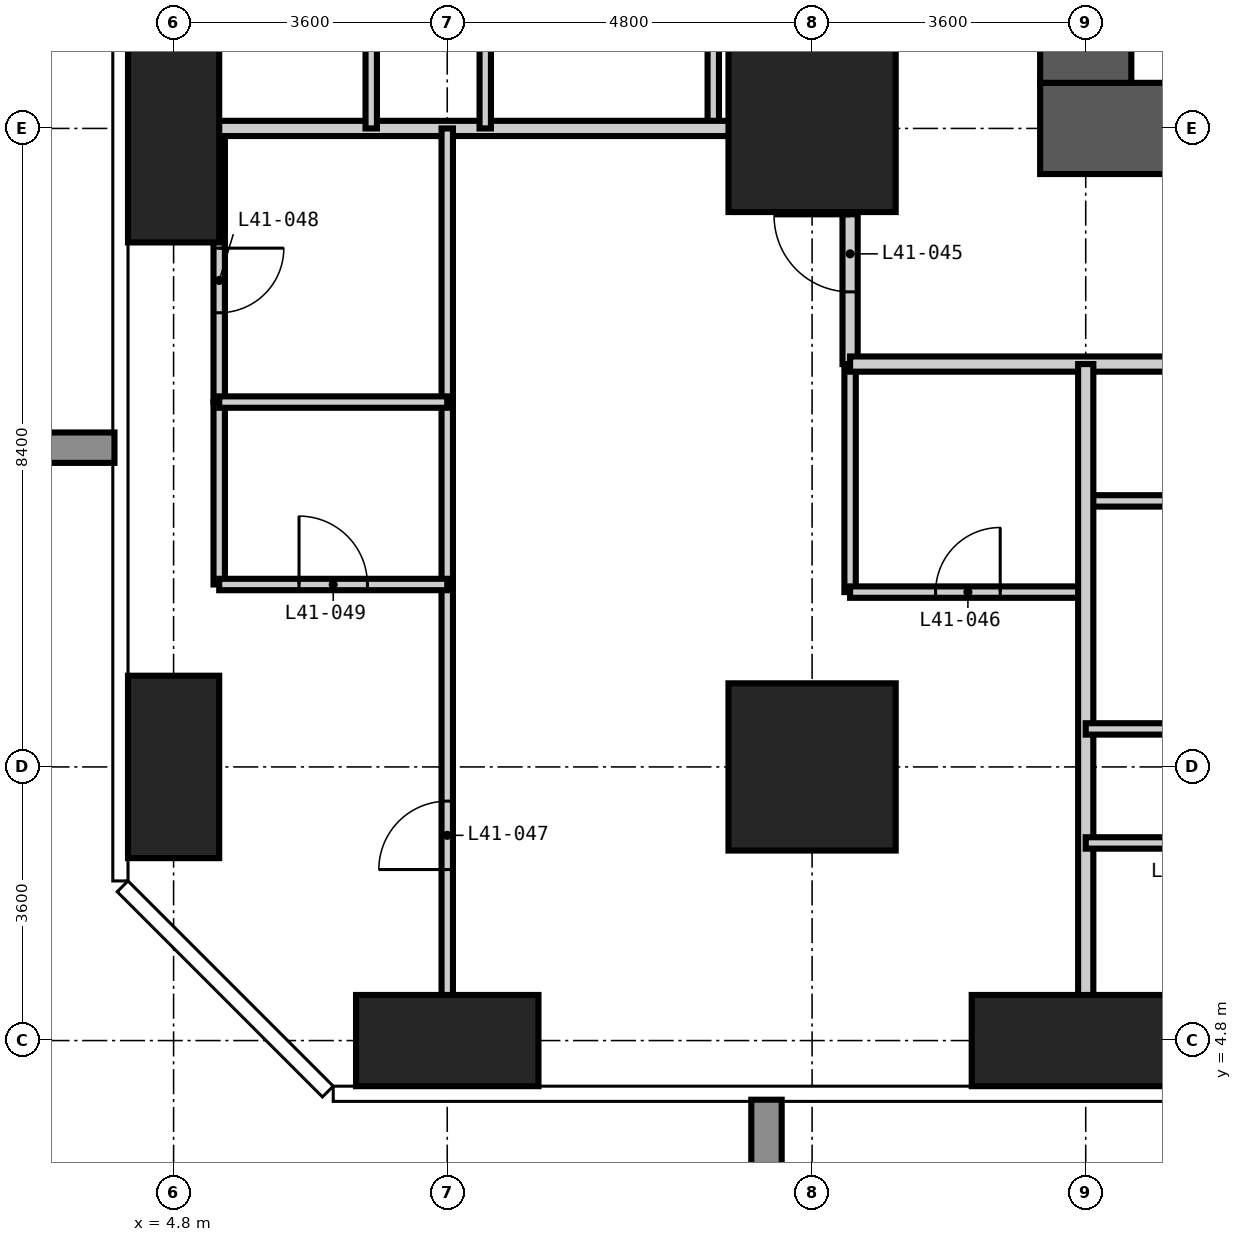
"""IFC4 building model, lengths in metres.
Left out: names, types, materials, properties, quantities, classifications, styles, units other than length and angle.
Written with IfcOpenShell. Run it as: python <this file> out.ifc"""

import sys

from ifc_helpers import new_model, si_unit, direction, frame, frame_2d, origin, origin_2d, place, context, subcontext, project, spatial, rectangle, extrude, element, fill, save


model = new_model("IFC4")
c1 = context("Model", 3, precision=1e-05, world=origin(), true_north=direction((0.0, 1.0)))
c2 = subcontext(c1, "Body", "Model", "MODEL_VIEW")
j1 = project(units=[si_unit("LENGTHUNIT", "METRE"), si_unit("PLANEANGLEUNIT", "RADIAN")], contexts=[c1])
p1 = place(None, origin())
s1 = spatial("IfcSite", under=j1, at=p1, CompositionType="ELEMENT")
p2 = place(p1, origin())
s2 = spatial("IfcBuilding", under=s1, at=p2, CompositionType="ELEMENT")
p3 = place(p2, frame((0.0, 0.0, 162.6)))
s3 = spatial("IfcBuildingStorey", under=s2, at=p3, CompositionType="ELEMENT", Elevation=162.6)
p4 = place(p3, frame((4.8, 8.4, -0.35), z_axis=(0.0, 0.0, 1.0), x_axis=(1.0, 0.0, 0.0)))
e1 = element("IfcColumn", 1, at=p4, inside=s3, PredefinedType="COLUMN", context=c2, shape_type="SweptSolid", body=[
    extrude(rectangle(XDim=1.2, YDim=2.4, at=origin_2d()), origin(), (0.0, 0.0, 1.0), 3.6),
])
p5 = place(p3, frame((4.8, 16.8, -0.35), z_axis=(0.0, 0.0, 1.0), x_axis=(1.0, 0.0, 0.0)))
e2 = element("IfcColumn", 2, at=p5, inside=s3, PredefinedType="COLUMN", context=c2, shape_type="SweptSolid", body=[
    extrude(rectangle(XDim=1.2, YDim=3.0, at=origin_2d()), origin(), (0.0, 0.0, 1.0), 3.6),
])
p6 = place(p3, frame((8.4, 4.8, -0.35), z_axis=(0.0, 0.0, 1.0), x_axis=(1.0, 0.0, 0.0)))
e3 = element("IfcColumn", 3, at=p6, inside=s3, PredefinedType="COLUMN", context=c2, shape_type="SweptSolid", body=[
    extrude(rectangle(XDim=2.4, YDim=1.2, at=origin_2d()), origin(), (0.0, 0.0, 1.0), 3.6),
])
for number, where, z_axis, x_axis in (
    (4, (13.2, 8.4, -0.35), (0.0, 0.0, 1.0), (1.0, 0.0, 0.0)),
    (5, (13.2, 16.8, -0.35), (0.0, 0.0, 1.0), (1.0, 0.0, 0.0)),
):
    element("IfcColumn", number, at=place(p3, frame(where, z_axis=z_axis, x_axis=x_axis)), inside=s3, PredefinedType="COLUMN", context=c2, shape_type="SweptSolid", body=[
        extrude(rectangle(XDim=2.2, YDim=2.2, at=origin_2d()), origin(), (0.0, 0.0, 1.0), 3.6),
    ])
p7 = place(p3, frame((16.8, 4.8, -0.35), z_axis=(0.0, 0.0, 1.0), x_axis=(1.0, 0.0, 0.0)))
e6 = element("IfcColumn", 6, at=p7, inside=s3, PredefinedType="COLUMN", context=c2, shape_type="SweptSolid", body=[
    extrude(rectangle(XDim=3.0, YDim=1.2, at=origin_2d()), origin(), (0.0, 0.0, 1.0), 3.6),
])
p8 = place(p3, frame((16.2, 16.8, -0.35), z_axis=(0.0, 0.0, 1.0), x_axis=(1.0, 0.0, 0.0)))
e7 = element("IfcWall", 7, at=p8, inside=s3, PredefinedType="SHEAR", context=c2, shape_type="SweptSolid", body=[
    extrude(rectangle(XDim=26.4, YDim=1.2, at=frame_2d((13.2, 0.0))), origin(), (0.0, 0.0, 1.0), 3.6),
])
p9 = place(p8, frame((12.7, 0.0, 0.35)))
e8 = element("IfcOpeningElement", 8, at=p9, cuts=e7, PredefinedType="OPENING", context=c2, shape_type="SweptSolid", body=[
    extrude(rectangle(XDim=1.0, YDim=2.1, at=frame_2d((0.5, 1.05))), frame((0.0, 0.61, 0.0), z_axis=(0.0, -1.0, 0.0), x_axis=(1.0, 0.0, 0.0)), (0.0, 0.0, 1.0), 1.22),
])
p10 = place(p8, frame((19.0, 0.0, 0.35)))
e9 = element("IfcOpeningElement", 9, at=p10, cuts=e7, PredefinedType="OPENING", context=c2, shape_type="SweptSolid", body=[
    extrude(rectangle(XDim=1.0, YDim=2.1, at=frame_2d((0.5, 1.05))), frame((0.0, 0.61, 0.0), z_axis=(0.0, -1.0, 0.0), x_axis=(1.0, 0.0, 0.0)), (0.0, 0.0, 1.0), 1.22),
])
p11 = place(p3, frame((16.8, 41.4, -0.35), z_axis=(0.0, 0.0, 1.0), x_axis=(0.0, -1.0, 0.0)))
e10 = element("IfcWall", 10, at=p11, inside=s3, PredefinedType="SHEAR", context=c2, shape_type="SweptSolid", body=[
    extrude(rectangle(XDim=24.0, YDim=1.2, at=frame_2d((12.0, 0.0))), origin(), (0.0, 0.0, 1.0), 3.6),
])
p12 = place(p11, frame((11.1, 0.0, 0.35)))
e11 = element("IfcOpeningElement", 11, at=p12, cuts=e10, PredefinedType="OPENING", context=c2, shape_type="SweptSolid", body=[
    extrude(rectangle(XDim=1.8, YDim=2.2, at=frame_2d((0.9, 1.1))), frame((0.0, 0.61, 0.0), z_axis=(0.0, -1.0, 0.0), x_axis=(1.0, 0.0, 0.0)), (0.0, 0.0, 1.0), 1.22),
])
p13 = place(p11, frame((19.9, 0.0, 0.35)))
e12 = element("IfcOpeningElement", 12, at=p13, cuts=e10, PredefinedType="OPENING", context=c2, shape_type="SweptSolid", body=[
    extrude(rectangle(XDim=1.0, YDim=2.1, at=frame_2d((0.5, 1.05))), frame((0.0, 0.61, 0.0), z_axis=(0.0, -1.0, 0.0), x_axis=(1.0, 0.0, 0.0)), (0.0, 0.0, 1.0), 1.22),
])
p14 = place(p11, frame((5.2, 0.0, 0.35)))
e13 = element("IfcOpeningElement", 13, at=p14, cuts=e10, PredefinedType="OPENING", context=c2, shape_type="SweptSolid", body=[
    extrude(rectangle(XDim=1.0, YDim=2.1, at=frame_2d((0.5, 1.05))), frame((0.0, 0.61, 0.0), z_axis=(0.0, -1.0, 0.0), x_axis=(1.0, 0.0, 0.0)), (0.0, 0.0, 1.0), 1.22),
])
p15 = place(p3, frame((5.4, 13.2, 0.0), z_axis=(0.0, 0.0, 1.0), x_axis=(0.0, 1.0, 0.0)))
e14 = element("IfcWall", 14, at=p15, inside=s3, PredefinedType="PARTITIONING", context=c2, shape_type="SweptSolid", body=[
    extrude(rectangle(XDim=3.6, YDim=0.15, at=frame_2d((1.8, 0.0))), origin(), (0.0, 0.0, 1.0), 3.25),
])
p16 = place(p15, frame((1.175, 0.0, 0.0)))
e15 = element("IfcOpeningElement", 15, at=p16, cuts=e14, PredefinedType="OPENING", context=c2, shape_type="SweptSolid", body=[
    extrude(rectangle(XDim=0.85, YDim=2.1, at=frame_2d((0.425, 1.05))), frame((0.0, 0.085, 0.0), z_axis=(0.0, -1.0, 0.0), x_axis=(1.0, 0.0, 0.0)), (0.0, 0.0, 1.0), 0.17),
])
p17 = place(p3, frame((11.9, 16.8, 0.0), z_axis=(0.0, 0.0, 1.0), x_axis=(0.0, 1.0, 0.0)))
e16 = element("IfcWall", 16, at=p17, inside=s3, PredefinedType="PARTITIONING", context=c2, shape_type="SweptSolid", body=[
    extrude(rectangle(XDim=3.0, YDim=0.15, at=frame_2d((1.5, 0.0))), origin(), (0.0, 0.0, 1.0), 3.25),
])
p18 = place(p17, frame((1.175, 0.0, 0.0)))
e17 = element("IfcOpeningElement", 17, at=p18, cuts=e16, PredefinedType="OPENING", context=c2, shape_type="SweptSolid", body=[
    extrude(rectangle(XDim=0.85, YDim=2.1, at=frame_2d((0.425, 1.05))), frame((0.0, 0.085, 0.0), z_axis=(0.0, -1.0, 0.0), x_axis=(1.0, 0.0, 0.0)), (0.0, 0.0, 1.0), 0.17),
])
p19 = place(p3, frame((13.7, 10.7, 0.0), z_axis=(0.0, 0.0, 1.0), x_axis=(0.0, 1.0, 0.0)))
e18 = element("IfcWall", 18, at=p19, inside=s3, PredefinedType="PARTITIONING", context=c2, shape_type="SweptSolid", body=[
    extrude(rectangle(XDim=3.0, YDim=0.15, at=frame_2d((1.5, 0.0))), origin(), (0.0, 0.0, 1.0), 3.25),
])
p20 = place(p3, frame((13.7, 10.7, 0.0), z_axis=(0.0, 0.0, 1.0), x_axis=(1.0, 0.0, 0.0)))
e19 = element("IfcWall", 19, at=p20, inside=s3, PredefinedType="PARTITIONING", context=c2, shape_type="SweptSolid", body=[
    extrude(rectangle(XDim=3.1, YDim=0.15, at=frame_2d((1.55, 0.0))), origin(), (0.0, 0.0, 1.0), 3.25),
])
p21 = place(p20, frame((1.125, 0.0, 0.0)))
e20 = element("IfcOpeningElement", 20, at=p21, cuts=e19, PredefinedType="OPENING", context=c2, shape_type="SweptSolid", body=[
    extrude(rectangle(XDim=0.85, YDim=2.1, at=frame_2d((0.425, 1.05))), frame((0.0, 0.085, 0.0), z_axis=(0.0, -1.0, 0.0), x_axis=(1.0, 0.0, 0.0)), (0.0, 0.0, 1.0), 0.17),
])
p22 = place(p3, frame((16.8, 11.9, 0.0), z_axis=(0.0, 0.0, 1.0), x_axis=(1.0, 0.0, 0.0)))
e21 = element("IfcWall", 21, at=p22, inside=s3, PredefinedType="PARTITIONING", context=c2, shape_type="SweptSolid", body=[
    extrude(rectangle(XDim=3.0, YDim=0.15, at=frame_2d((1.5, 0.0))), origin(), (0.0, 0.0, 1.0), 3.25),
])
p23 = place(p3, frame((13.7, 13.7, 0.0), z_axis=(0.0, 0.0, 1.0), x_axis=(0.0, 1.0, 0.0)))
e22 = element("IfcWall", 22, at=p23, inside=s3, PredefinedType="PARTITIONING", context=c2, shape_type="SweptSolid", body=[
    extrude(rectangle(XDim=30.8, YDim=0.2, at=frame_2d((15.4, 0.0))), origin(), (0.0, 0.0, 1.0), 3.25),
])
p24 = place(p23, frame((4.7, 0.0, 0.0)))
e23 = element("IfcOpeningElement", 23, at=p24, cuts=e22, PredefinedType="OPENING", context=c2, shape_type="SweptSolid", body=[
    extrude(rectangle(XDim=1.0, YDim=2.2, at=frame_2d((0.5, 1.1))), frame((0.0, 0.11, 0.0), z_axis=(0.0, -1.0, 0.0), x_axis=(1.0, 0.0, 0.0)), (0.0, 0.0, 1.0), 0.22),
])
p25 = place(p23, frame((8.9, 0.0, 0.0)))
e24 = element("IfcOpeningElement", 24, at=p25, cuts=e22, PredefinedType="OPENING", context=c2, shape_type="SweptSolid", body=[
    extrude(rectangle(XDim=1.0, YDim=2.2, at=frame_2d((0.5, 1.1))), frame((0.0, 0.11, 0.0), z_axis=(0.0, -1.0, 0.0), x_axis=(1.0, 0.0, 0.0)), (0.0, 0.0, 1.0), 0.22),
])
p26 = place(p23, frame((13.1, 0.0, 0.0)))
e25 = element("IfcOpeningElement", 25, at=p26, cuts=e22, PredefinedType="OPENING", context=c2, shape_type="SweptSolid", body=[
    extrude(rectangle(XDim=1.0, YDim=2.2, at=frame_2d((0.5, 1.1))), frame((0.0, 0.11, 0.0), z_axis=(0.0, -1.0, 0.0), x_axis=(1.0, 0.0, 0.0)), (0.0, 0.0, 1.0), 0.22),
])
p27 = place(p23, frame((17.3, 0.0, 0.0)))
e26 = element("IfcOpeningElement", 26, at=p27, cuts=e22, PredefinedType="OPENING", context=c2, shape_type="SweptSolid", body=[
    extrude(rectangle(XDim=1.0, YDim=2.2, at=frame_2d((0.5, 1.1))), frame((0.0, 0.11, 0.0), z_axis=(0.0, -1.0, 0.0), x_axis=(1.0, 0.0, 0.0)), (0.0, 0.0, 1.0), 0.22),
])
p28 = place(p23, frame((21.5, 0.0, 0.0)))
e27 = element("IfcOpeningElement", 27, at=p28, cuts=e22, PredefinedType="OPENING", context=c2, shape_type="SweptSolid", body=[
    extrude(rectangle(XDim=1.0, YDim=2.2, at=frame_2d((0.5, 1.1))), frame((0.0, 0.11, 0.0), z_axis=(0.0, -1.0, 0.0), x_axis=(1.0, 0.0, 0.0)), (0.0, 0.0, 1.0), 0.22),
])
p29 = place(p23, frame((25.7, 0.0, 0.0)))
e28 = element("IfcOpeningElement", 28, at=p29, cuts=e22, PredefinedType="OPENING", context=c2, shape_type="SweptSolid", body=[
    extrude(rectangle(XDim=1.0, YDim=2.2, at=frame_2d((0.5, 1.1))), frame((0.0, 0.11, 0.0), z_axis=(0.0, -1.0, 0.0), x_axis=(1.0, 0.0, 0.0)), (0.0, 0.0, 1.0), 0.22),
])
p30 = place(p23, frame((0.95, 0.0, 0.0)))
e29 = element("IfcOpeningElement", 29, at=p30, cuts=e22, PredefinedType="OPENING", context=c2, shape_type="SweptSolid", body=[
    extrude(rectangle(XDim=1.0, YDim=2.2, at=frame_2d((0.5, 1.1))), frame((0.0, 0.11, 0.0), z_axis=(0.0, -1.0, 0.0), x_axis=(1.0, 0.0, 0.0)), (0.0, 0.0, 1.0), 0.22),
])
p31 = place(p23, frame((29.45, 0.0, 0.0)))
e30 = element("IfcOpeningElement", 30, at=p31, cuts=e22, PredefinedType="OPENING", context=c2, shape_type="SweptSolid", body=[
    extrude(rectangle(XDim=1.0, YDim=2.2, at=frame_2d((0.5, 1.1))), frame((0.0, 0.11, 0.0), z_axis=(0.0, -1.0, 0.0), x_axis=(1.0, 0.0, 0.0)), (0.0, 0.0, 1.0), 0.22),
])
p32 = place(p3, frame((45.7, 13.7, 0.0), z_axis=(0.0, 0.0, 1.0), x_axis=(-1.0, 0.0, 0.0)))
e31 = element("IfcWall", 31, at=p32, inside=s3, PredefinedType="PARTITIONING", context=c2, shape_type="SweptSolid", body=[
    extrude(rectangle(XDim=32.0, YDim=0.2, at=frame_2d((16.0, 0.0))), origin(), (0.0, 0.0, 1.0), 3.25),
])
p33 = place(p32, frame((24.2, 0.0, 0.0)))
e32 = element("IfcOpeningElement", 32, at=p33, cuts=e31, PredefinedType="OPENING", context=c2, shape_type="SweptSolid", body=[
    extrude(rectangle(XDim=1.0, YDim=2.2, at=frame_2d((0.5, 1.1))), frame((0.0, 0.11, 0.0), z_axis=(0.0, -1.0, 0.0), x_axis=(1.0, 0.0, 0.0)), (0.0, 0.0, 1.0), 0.22),
])
p34 = place(p32, frame((15.8, 0.0, 0.0)))
e33 = element("IfcOpeningElement", 33, at=p34, cuts=e31, PredefinedType="OPENING", context=c2, shape_type="SweptSolid", body=[
    extrude(rectangle(XDim=1.0, YDim=2.2, at=frame_2d((0.5, 1.1))), frame((0.0, 0.11, 0.0), z_axis=(0.0, -1.0, 0.0), x_axis=(1.0, 0.0, 0.0)), (0.0, 0.0, 1.0), 0.22),
])
p35 = place(p32, frame((7.4, 0.0, 0.0)))
e34 = element("IfcOpeningElement", 34, at=p35, cuts=e31, PredefinedType="OPENING", context=c2, shape_type="SweptSolid", body=[
    extrude(rectangle(XDim=1.0, YDim=2.2, at=frame_2d((0.5, 1.1))), frame((0.0, 0.11, 0.0), z_axis=(0.0, -1.0, 0.0), x_axis=(1.0, 0.0, 0.0)), (0.0, 0.0, 1.0), 0.22),
])
for number, where, z_axis, x_axis in (
    (35, (16.8, 4.182, 0.0), (0.0, 0.0, 1.0), (0.0, 1.0, 0.0)),
    (36, (4.182, 16.8, 0.0), (0.0, 0.0, 1.0), (1.0, 0.0, 0.0)),
):
    element("IfcWall", number, at=place(p3, frame(where, z_axis=z_axis, x_axis=x_axis)), inside=s3, PredefinedType="PARTITIONING", context=c2, shape_type="SweptSolid", body=[
        extrude(rectangle(XDim=9.518, YDim=0.2, at=frame_2d((4.759, 0.0))), origin(), (0.0, 0.0, 1.0), 3.25),
    ])
p36 = place(p3, frame((5.4, 10.8, 0.0), z_axis=(0.0, 0.0, 1.0), x_axis=(0.0, 1.0, 0.0)))
e37 = element("IfcWall", 37, at=p36, inside=s3, PredefinedType="PARTITIONING", context=c2, shape_type="SweptSolid", body=[
    extrude(rectangle(XDim=2.4, YDim=0.15, at=frame_2d((1.2, 0.0))), origin(), (0.0, 0.0, 1.0), 3.25),
])
p37 = place(p3, frame((7.4, 16.8, 0.0), z_axis=(0.0, 0.0, 1.0), x_axis=(0.0, 1.0, 0.0)))
e38 = element("IfcWall", 38, at=p37, inside=s3, PredefinedType="PARTITIONING", context=c2, shape_type="SweptSolid", body=[
    extrude(rectangle(XDim=3.0, YDim=0.15, at=frame_2d((1.5, 0.0))), origin(), (0.0, 0.0, 1.0), 3.25),
])
p38 = place(p37, frame((1.05, 0.0, 0.0)))
e39 = element("IfcOpeningElement", 39, at=p38, cuts=e38, PredefinedType="OPENING", context=c2, shape_type="SweptSolid", body=[
    extrude(rectangle(XDim=0.9, YDim=2.1, at=frame_2d((0.45, 1.05))), frame((0.0, 0.085, 0.0), z_axis=(0.0, -1.0, 0.0), x_axis=(1.0, 0.0, 0.0)), (0.0, 0.0, 1.0), 0.17),
])
p39 = place(p3, frame((8.4, 4.182, 0.0), z_axis=(0.0, 0.0, 1.0), x_axis=(0.0, 1.0, 0.0)))
e40 = element("IfcWall", 40, at=p39, inside=s3, PredefinedType="PARTITIONING", context=c2, shape_type="SweptSolid", body=[
    extrude(rectangle(XDim=12.618, YDim=0.15, at=frame_2d((6.309, 0.0))), origin(), (0.0, 0.0, 1.0), 3.25),
])
p40 = place(p39, frame((2.868, 0.0, 0.0)))
e41 = element("IfcOpeningElement", 41, at=p40, cuts=e40, PredefinedType="OPENING", context=c2, shape_type="SweptSolid", body=[
    extrude(rectangle(XDim=0.9, YDim=2.1, at=frame_2d((0.45, 1.05))), frame((0.0, 0.085, 0.0), z_axis=(0.0, -1.0, 0.0), x_axis=(1.0, 0.0, 0.0)), (0.0, 0.0, 1.0), 0.17),
])
p41 = place(p3, frame((8.9, 16.8, 0.0), z_axis=(0.0, 0.0, 1.0), x_axis=(0.0, 1.0, 0.0)))
e42 = element("IfcWall", 42, at=p41, inside=s3, PredefinedType="PARTITIONING", context=c2, shape_type="SweptSolid", body=[
    extrude(rectangle(XDim=3.0, YDim=0.15, at=frame_2d((1.5, 0.0))), origin(), (0.0, 0.0, 1.0), 3.25),
])
p42 = place(p3, frame((16.8, 7.4, 0.0), z_axis=(0.0, 0.0, 1.0), x_axis=(1.0, 0.0, 0.0)))
e43 = element("IfcWall", 43, at=p42, inside=s3, PredefinedType="PARTITIONING", context=c2, shape_type="SweptSolid", body=[
    extrude(rectangle(XDim=3.0, YDim=0.15, at=frame_2d((1.5, 0.0))), origin(), (0.0, 0.0, 1.0), 3.25),
])
p43 = place(p42, frame((1.05, 0.0, 0.0)))
e44 = element("IfcOpeningElement", 44, at=p43, cuts=e43, PredefinedType="OPENING", context=c2, shape_type="SweptSolid", body=[
    extrude(rectangle(XDim=0.9, YDim=2.1, at=frame_2d((0.45, 1.05))), frame((0.0, 0.085, 0.0), z_axis=(0.0, -1.0, 0.0), x_axis=(1.0, 0.0, 0.0)), (0.0, 0.0, 1.0), 0.17),
])
p44 = place(p3, frame((16.8, 8.9, 0.0), z_axis=(0.0, 0.0, 1.0), x_axis=(1.0, 0.0, 0.0)))
e45 = element("IfcWall", 45, at=p44, inside=s3, PredefinedType="PARTITIONING", context=c2, shape_type="SweptSolid", body=[
    extrude(rectangle(XDim=3.0, YDim=0.15, at=frame_2d((1.5, 0.0))), origin(), (0.0, 0.0, 1.0), 3.25),
])
p45 = place(p3, frame((5.4, 10.8, 0.0), z_axis=(0.0, 0.0, 1.0), x_axis=(1.0, 0.0, 0.0)))
e46 = element("IfcWall", 46, at=p45, inside=s3, PredefinedType="PARTITIONING", context=c2, shape_type="SweptSolid", body=[
    extrude(rectangle(XDim=3.0, YDim=0.15, at=frame_2d((1.5, 0.0))), origin(), (0.0, 0.0, 1.0), 3.25),
])
p46 = place(p45, frame((1.05, 0.0, 0.0)))
e47 = element("IfcOpeningElement", 47, at=p46, cuts=e46, PredefinedType="OPENING", context=c2, shape_type="SweptSolid", body=[
    extrude(rectangle(XDim=0.9, YDim=2.1, at=frame_2d((0.45, 1.05))), frame((0.0, 0.085, 0.0), z_axis=(0.0, -1.0, 0.0), x_axis=(1.0, 0.0, 0.0)), (0.0, 0.0, 1.0), 0.17),
])
p47 = place(p3, frame((5.4, 13.2, 0.0), z_axis=(0.0, 0.0, 1.0), x_axis=(1.0, 0.0, 0.0)))
e48 = element("IfcWall", 48, at=p47, inside=s3, PredefinedType="PARTITIONING", context=c2, shape_type="SweptSolid", body=[
    extrude(rectangle(XDim=3.0, YDim=0.15, at=frame_2d((1.5, 0.0))), origin(), (0.0, 0.0, 1.0), 3.25),
])
p48 = place(p30, origin())
e49 = element("IfcDoor", 49, at=p48, inside=s3, OperationType="SINGLE_SWING_RIGHT", PredefinedType="DOOR", context=c2, shape_type="SweptSolid", body=[
    extrude(rectangle(XDim=1.0, YDim=2.2, at=frame_2d((0.5, 1.1))), frame((0.0, 0.025, 0.0), z_axis=(0.0, -1.0, 0.0), x_axis=(1.0, 0.0, 0.0)), (0.0, 0.0, 1.0), 0.05),
])
fill(e29, e49)
p49 = place(p21, origin())
e50 = element("IfcDoor", 50, at=p49, inside=s3, OperationType="SINGLE_SWING_RIGHT", PredefinedType="DOOR", context=c2, shape_type="SweptSolid", body=[
    extrude(rectangle(XDim=0.85, YDim=2.1, at=frame_2d((0.425, 1.05))), frame((0.0, 0.025, 0.0), z_axis=(0.0, -1.0, 0.0), x_axis=(1.0, 0.0, 0.0)), (0.0, 0.0, 1.0), 0.05),
])
fill(e20, e50)
p50 = place(p40, origin())
e51 = element("IfcDoor", 51, at=p50, inside=s3, OperationType="SINGLE_SWING_LEFT", PredefinedType="DOOR", context=c2, shape_type="SweptSolid", body=[
    extrude(rectangle(XDim=0.9, YDim=2.1, at=frame_2d((0.45, 1.05))), frame((0.0, 0.025, 0.0), z_axis=(0.0, -1.0, 0.0), x_axis=(1.0, 0.0, 0.0)), (0.0, 0.0, 1.0), 0.05),
])
fill(e41, e51)
p51 = place(p16, frame((0.85, 0.0, 0.0), z_axis=(0.0, 0.0, 1.0), x_axis=(-1.0, 0.0, 0.0)))
e52 = element("IfcDoor", 52, at=p51, inside=s3, OperationType="SINGLE_SWING_LEFT", PredefinedType="DOOR", context=c2, shape_type="SweptSolid", body=[
    extrude(rectangle(XDim=0.85, YDim=2.1, at=frame_2d((0.425, 1.05))), frame((0.0, 0.025, 0.0), z_axis=(0.0, -1.0, 0.0), x_axis=(1.0, 0.0, 0.0)), (0.0, 0.0, 1.0), 0.05),
])
fill(e15, e52)
p52 = place(p46, origin())
e53 = element("IfcDoor", 53, at=p52, inside=s3, OperationType="SINGLE_SWING_LEFT", PredefinedType="DOOR", context=c2, shape_type="SweptSolid", body=[
    extrude(rectangle(XDim=0.9, YDim=2.1, at=frame_2d((0.45, 1.05))), frame((0.0, 0.025, 0.0), z_axis=(0.0, -1.0, 0.0), x_axis=(1.0, 0.0, 0.0)), (0.0, 0.0, 1.0), 0.05),
])
fill(e47, e53)
save(model, sys.argv[1])
